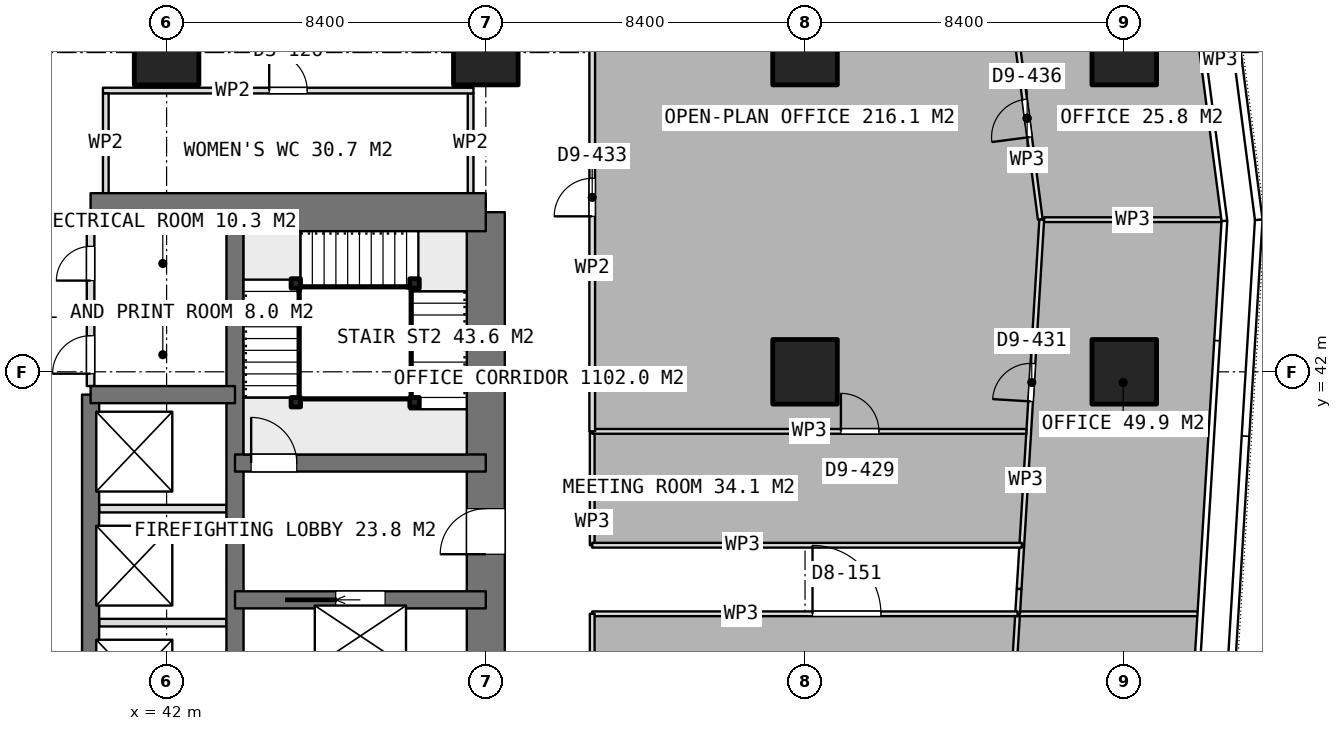
"""IFC4 building model, lengths in metres.
Left out: names, types, materials, properties, quantities, classifications, styles, units other than length and angle.
Written with IfcOpenShell. Run it as: python <this file> out.ifc"""

import sys

from ifc_helpers import new_model, si_unit, direction, frame, frame_2d, origin, origin_2d, place, context, subcontext, project, spatial, rectangle, extrude, element, fill, save


model = new_model("IFC4")
c1 = context("Model", 3, precision=1e-05, world=origin(), true_north=direction((0.0, 1.0)))
c2 = subcontext(c1, "Body", "Model", "MODEL_VIEW")
j1 = project(units=[si_unit("LENGTHUNIT", "METRE"), si_unit("PLANEANGLEUNIT", "RADIAN")], contexts=[c1])
p1 = place(None, origin())
s1 = spatial("IfcSite", under=j1, at=p1, CompositionType="ELEMENT")
p2 = place(p1, origin())
s2 = spatial("IfcBuilding", under=s1, at=p2, CompositionType="ELEMENT")
p3 = place(p2, frame((0.0, 0.0, 117.8)))
s3 = spatial("IfcBuildingStorey", under=s2, at=p3, CompositionType="ELEMENT", Elevation=117.8)
p4 = place(p3, frame((40.0, 46.2, 0.0), z_axis=(0.0, 0.0, 1.0), x_axis=(1.0, 0.0, 0.0)))
e1 = element("IfcWall", 1, at=p4, inside=s3, PredefinedType="SHEAR", context=c2, shape_type="SweptSolid", body=[
    extrude(rectangle(XDim=10.4, YDim=1.0, at=frame_2d((5.2, 0.0))), origin(), (0.0, 0.0, 1.0), 3.75),
])
p5 = place(p3, frame((50.4, 21.0, 0.0), z_axis=(0.0, 0.0, 1.0), x_axis=(0.0, 1.0, 0.0)))
e2 = element("IfcWall", 2, at=p5, inside=s3, PredefinedType="SHEAR", context=c2, shape_type="SweptSolid", body=[
    extrude(rectangle(XDim=25.2, YDim=1.0, at=frame_2d((12.6, 0.0))), origin(), (0.0, 0.0, 1.0), 3.75),
])
p6 = place(p5, frame((16.2, 0.0, 0.0)))
e3 = element("IfcOpeningElement", 3, at=p6, cuts=e2, PredefinedType="OPENING", context=c2, shape_type="SweptSolid", body=[
    extrude(rectangle(XDim=1.2, YDim=2.1, at=frame_2d((0.6, 1.05))), frame((0.0, 0.51, 0.0), z_axis=(0.0, -1.0, 0.0), x_axis=(1.0, 0.0, 0.0)), (0.0, 0.0, 1.0), 1.02),
])
p7 = place(p5, frame((10.05, 0.0, 0.0)))
e4 = element("IfcOpeningElement", 4, at=p7, cuts=e2, PredefinedType="OPENING", context=c2, shape_type="SweptSolid", body=[
    extrude(rectangle(XDim=0.9, YDim=2.1, at=frame_2d((0.45, 1.05))), frame((0.0, 0.51, 0.0), z_axis=(0.0, -1.0, 0.0), x_axis=(1.0, 0.0, 0.0)), (0.0, 0.0, 1.0), 1.02),
])
p8 = place(p5, frame((7.45, 0.0, 0.0)))
e5 = element("IfcOpeningElement", 5, at=p8, cuts=e2, PredefinedType="OPENING", context=c2, shape_type="SweptSolid", body=[
    extrude(rectangle(XDim=0.9, YDim=2.1, at=frame_2d((0.45, 1.05))), frame((0.0, 0.51, 0.0), z_axis=(0.0, -1.0, 0.0), x_axis=(1.0, 0.0, 0.0)), (0.0, 0.0, 1.0), 1.02),
])
p9 = place(p5, frame((0.7, 0.0, 0.0)))
e6 = element("IfcOpeningElement", 6, at=p9, cuts=e2, PredefinedType="OPENING", context=c2, shape_type="SweptSolid", body=[
    extrude(rectangle(XDim=1.2, YDim=2.1, at=frame_2d((0.6, 1.05))), frame((0.0, 0.51, 0.0), z_axis=(0.0, -1.0, 0.0), x_axis=(1.0, 0.0, 0.0)), (0.0, 0.0, 1.0), 1.02),
])
p10 = place(p3, frame((43.8, 21.0, 0.0), z_axis=(0.0, 0.0, 1.0), x_axis=(0.0, 1.0, 0.0)))
e7 = element("IfcWall", 7, at=p10, inside=s3, PredefinedType="SHEAR", context=c2, shape_type="SweptSolid", body=[
    extrude(rectangle(XDim=25.2, YDim=0.45, at=frame_2d((12.6, 0.0))), origin(), (0.0, 0.0, 1.0), 3.75),
])
p11 = place(p3, frame((40.0, 23.4, 0.0), z_axis=(0.0, 0.0, 1.0), x_axis=(0.0, 1.0, 0.0)))
e8 = element("IfcWall", 8, at=p11, inside=s3, PredefinedType="SHEAR", context=c2, shape_type="SweptSolid", body=[
    extrude(rectangle(XDim=18.0, YDim=0.45, at=frame_2d((9.0, 0.0))), origin(), (0.0, 0.0, 1.0), 3.75),
])
p12 = place(p11, frame((0.4, 0.0, 0.0)))
e9 = element("IfcOpeningElement", 9, at=p12, cuts=e8, PredefinedType="OPENING", context=c2, shape_type="SweptSolid", body=[
    extrude(rectangle(XDim=0.9, YDim=2.1, at=frame_2d((0.45, 1.05))), frame((0.0, 0.235, 0.0), z_axis=(0.0, -1.0, 0.0), x_axis=(1.0, 0.0, 0.0)), (0.0, 0.0, 1.0), 0.47),
])
p13 = place(p11, frame((3.35, 0.0, 0.0)))
e10 = element("IfcOpeningElement", 10, at=p13, cuts=e8, PredefinedType="OPENING", context=c2, shape_type="SweptSolid", body=[
    extrude(rectangle(XDim=1.0, YDim=2.1, at=frame_2d((0.5, 1.05))), frame((0.0, 0.235, 0.0), z_axis=(0.0, -1.0, 0.0), x_axis=(1.0, 0.0, 0.0)), (0.0, 0.0, 1.0), 0.47),
])
p14 = place(p3, frame((40.0, 41.4, 0.0), z_axis=(0.0, 0.0, 1.0), x_axis=(1.0, 0.0, 0.0)))
e11 = element("IfcWall", 11, at=p14, inside=s3, PredefinedType="SHEAR", context=c2, shape_type="SweptSolid", body=[
    extrude(rectangle(XDim=3.8, YDim=0.45, at=frame_2d((1.9, 0.0))), origin(), (0.0, 0.0, 1.0), 3.75),
])
p15 = place(p3, frame((43.8, 36.0, 0.0), z_axis=(0.0, 0.0, 1.0), x_axis=(1.0, 0.0, 0.0)))
e12 = element("IfcWall", 12, at=p15, inside=s3, PredefinedType="SHEAR", context=c2, shape_type="SweptSolid", body=[
    extrude(rectangle(XDim=6.6, YDim=0.45, at=frame_2d((3.3, 0.0))), origin(), (0.0, 0.0, 1.0), 3.75),
])
p16 = place(p15, frame((2.65, 0.0, 0.0)))
e13 = element("IfcOpeningElement", 13, at=p16, cuts=e12, PredefinedType="OPENING", context=c2, shape_type="SweptSolid", body=[
    extrude(rectangle(XDim=1.3, YDim=2.1, at=frame_2d((0.65, 1.05))), frame((0.0, 0.235, 0.0), z_axis=(0.0, -1.0, 0.0), x_axis=(1.0, 0.0, 0.0)), (0.0, 0.0, 1.0), 0.47),
])
p17 = place(p3, frame((43.8, 39.6, 0.0), z_axis=(0.0, 0.0, 1.0), x_axis=(1.0, 0.0, 0.0)))
e14 = element("IfcWall", 14, at=p17, inside=s3, PredefinedType="SHEAR", context=c2, shape_type="SweptSolid", body=[
    extrude(rectangle(XDim=6.6, YDim=0.45, at=frame_2d((3.3, 0.0))), origin(), (0.0, 0.0, 1.0), 3.75),
])
p18 = place(p17, frame((0.425, 0.0, 0.0)))
e15 = element("IfcOpeningElement", 15, at=p18, cuts=e14, PredefinedType="OPENING", context=c2, shape_type="SweptSolid", body=[
    extrude(rectangle(XDim=1.2, YDim=2.1, at=frame_2d((0.6, 1.05))), frame((0.0, 0.235, 0.0), z_axis=(0.0, -1.0, 0.0), x_axis=(1.0, 0.0, 0.0)), (0.0, 0.0, 1.0), 0.47),
])
for number, where, z_axis, x_axis in (
    (16, (42.0, 50.4, 0.0), (0.0, 0.0, 1.0), (1.0, 0.0, 0.0)),
    (17, (50.4, 50.4, 0.0), (0.0, 0.0, 1.0), (1.0, 0.0, 0.0)),
    (18, (58.8, 42.0, 0.0), (0.0, 0.0, 1.0), (1.0, 0.0, 0.0)),
    (19, (58.8, 50.4, 0.0), (0.0, 0.0, 1.0), (1.0, 0.0, 0.0)),
    (20, (67.2, 42.0, 0.0), (0.0, 0.0, 1.0), (1.0, 0.0, 0.0)),
    (21, (67.2, 50.4, 0.0), (0.0, 0.0, 1.0), (1.0, 0.0, 0.0)),
):
    element("IfcColumn", number, at=place(p3, frame(where, z_axis=z_axis, x_axis=x_axis)), inside=s3, PredefinedType="COLUMN", context=c2, shape_type="SweptSolid", body=[
        extrude(rectangle(XDim=1.7, YDim=1.7, at=origin_2d()), origin(), (0.0, 0.0, 1.0), 3.75),
    ])
for number, where, z_axis, x_axis in (
    (22, (40.225, 35.4, 0.0), (0.0, 0.0, 1.0), (1.0, 0.0, 0.0)),
    (23, (40.225, 38.4, 0.0), (0.0, 0.0, 1.0), (1.0, 0.0, 0.0)),
):
    element("IfcWall", number, at=place(p3, frame(where, z_axis=z_axis, x_axis=x_axis)), inside=s3, PredefinedType="PARTITIONING", context=c2, shape_type="SweptSolid", body=[
        extrude(rectangle(XDim=3.35, YDim=0.2, at=frame_2d((1.675, 0.0))), origin(), (0.0, 0.0, 1.0), 3.5),
    ])
p19 = place(p3, frame((40.0, 41.625, 0.0), z_axis=(0.0, 0.0, 1.0), x_axis=(0.0, 1.0, 0.0)))
e24 = element("IfcWall", 24, at=p19, inside=s3, PredefinedType="PARTITIONING", context=c2, shape_type="SweptSolid", body=[
    extrude(rectangle(XDim=4.075, YDim=0.2, at=frame_2d((2.038, 0.0))), origin(), (0.0, 0.0, 1.0), 3.5),
])
p20 = place(p19, frame((2.775, 0.0, 0.0)))
e25 = element("IfcOpeningElement", 25, at=p20, cuts=e24, PredefinedType="OPENING", context=c2, shape_type="SweptSolid", body=[
    extrude(rectangle(XDim=0.9, YDim=2.1, at=frame_2d((0.45, 1.05))), frame((0.0, 0.11, 0.0), z_axis=(0.0, -1.0, 0.0), x_axis=(1.0, 0.0, 0.0)), (0.0, 0.0, 1.0), 0.22),
])
p21 = place(p19, frame((0.325, 0.0, 0.0)))
e26 = element("IfcOpeningElement", 26, at=p21, cuts=e24, PredefinedType="OPENING", context=c2, shape_type="SweptSolid", body=[
    extrude(rectangle(XDim=1.0, YDim=2.1, at=frame_2d((0.5, 1.05))), frame((0.0, 0.11, 0.0), z_axis=(0.0, -1.0, 0.0), x_axis=(1.0, 0.0, 0.0)), (0.0, 0.0, 1.0), 0.22),
])
p22 = place(p3, frame((40.0, 43.5, 0.0), z_axis=(0.0, 0.0, 1.0), x_axis=(1.0, 0.0, 0.0)))
e27 = element("IfcWall", 27, at=p22, inside=s3, PredefinedType="PARTITIONING", context=c2, shape_type="SweptSolid", body=[
    extrude(rectangle(XDim=3.575, YDim=0.2, at=frame_2d((1.788, 0.0))), origin(), (0.0, 0.0, 1.0), 3.5),
])
p23 = place(p3, frame((40.325, 49.4, 0.0), z_axis=(0.0, 0.0, 1.0), x_axis=(1.0, 0.0, 0.0)))
e28 = element("IfcWall", 28, at=p23, inside=s3, PredefinedType="PARTITIONING", context=c2, shape_type="SweptSolid", body=[
    extrude(rectangle(XDim=9.75, YDim=0.15, at=frame_2d((4.875, 0.0))), origin(), (0.0, 0.0, 1.0), 3.5),
])
p24 = place(p23, frame((4.375, 0.0, 0.0)))
e29 = element("IfcOpeningElement", 29, at=p24, cuts=e28, PredefinedType="OPENING", context=c2, shape_type="SweptSolid", body=[
    extrude(rectangle(XDim=1.0, YDim=2.1, at=frame_2d((0.5, 1.05))), frame((0.0, 0.085, 0.0), z_axis=(0.0, -1.0, 0.0), x_axis=(1.0, 0.0, 0.0)), (0.0, 0.0, 1.0), 0.17),
])
for number, where, z_axis, x_axis in (
    (30, (40.4, 46.7, 0.0), (0.0, 0.0, 1.0), (0.0, 1.0, 0.0)),
    (31, (50.0, 46.7, 0.0), (0.0, 0.0, 1.0), (0.0, 1.0, 0.0)),
):
    element("IfcWall", number, at=place(p3, frame(where, z_axis=z_axis, x_axis=x_axis)), inside=s3, PredefinedType="PARTITIONING", context=c2, shape_type="SweptSolid", body=[
        extrude(rectangle(XDim=2.625, YDim=0.15, at=frame_2d((1.312, 0.0))), origin(), (0.0, 0.0, 1.0), 3.5),
    ])
p25 = place(p3, frame((63.926, 27.997, 0.0), z_axis=(0.0, 0.0, 1.0), x_axis=(0.061176245149, 0.998126979412, 0.0)))
e32 = element("IfcWall", 32, at=p25, inside=s3, PredefinedType="PARTITIONING", context=c2, shape_type="SweptSolid", body=[
    extrude(rectangle(XDim=7.65, YDim=0.125, at=frame_2d((3.825, 0.0))), origin(), (0.0, 0.0, 1.0), 3.5),
])
p26 = place(p25, frame((3.325, 0.0, 0.0)))
e33 = element("IfcOpeningElement", 33, at=p26, cuts=e32, PredefinedType="OPENING", context=c2, shape_type="SweptSolid", body=[
    extrude(rectangle(XDim=1.0, YDim=2.1, at=frame_2d((0.5, 1.05))), frame((0.0, 0.073, 0.0), z_axis=(0.0, -1.0, 0.0), x_axis=(1.0, 0.0, 0.0)), (0.0, 0.0, 1.0), 0.145),
])
p27 = place(p3, frame((64.394, 35.633, 0.0), z_axis=(0.0, 0.0, 1.0), x_axis=(1.0, 0.0, 0.0)))
e34 = element("IfcWall", 34, at=p27, inside=s3, PredefinedType="PARTITIONING", context=c2, shape_type="SweptSolid", body=[
    extrude(rectangle(XDim=4.758, YDim=0.125, at=frame_2d((2.379, 0.0))), origin(), (0.0, 0.0, 1.0), 3.5),
])
p28 = place(p3, frame((64.434, 36.286, 0.0), z_axis=(0.0, 0.0, 1.0), x_axis=(0.060546193712, 0.998165396328, 0.0)))
e35 = element("IfcWall", 35, at=p28, inside=s3, PredefinedType="PARTITIONING", context=c2, shape_type="SweptSolid", body=[
    extrude(rectangle(XDim=1.153, YDim=0.125, at=frame_2d((0.577, 0.0))), origin(), (0.0, 0.0, 1.0), 3.5),
])
p29 = place(p3, frame((64.504, 37.437, 0.0), z_axis=(0.0, 0.0, 1.0), x_axis=(0.061148210755, 0.998128697274, 0.0)))
e36 = element("IfcWall", 36, at=p29, inside=s3, PredefinedType="PARTITIONING", context=c2, shape_type="SweptSolid", body=[
    extrude(rectangle(XDim=8.588, YDim=0.125, at=frame_2d((4.294, 0.0))), origin(), (0.0, 0.0, 1.0), 3.5),
])
p30 = place(p29, frame((3.791, 0.0, 0.0)))
e37 = element("IfcOpeningElement", 37, at=p30, cuts=e36, PredefinedType="OPENING", context=c2, shape_type="SweptSolid", body=[
    extrude(rectangle(XDim=1.0, YDim=2.1, at=frame_2d((0.5, 1.05))), frame((0.0, 0.073, 0.0), z_axis=(0.0, -1.0, 0.0), x_axis=(1.0, 0.0, 0.0)), (0.0, 0.0, 1.0), 0.145),
])
p31 = place(p3, frame((65.091, 46.003, 0.0), z_axis=(0.0, 0.0, 1.0), x_axis=(1.0, 0.0, 0.0)))
e38 = element("IfcWall", 38, at=p31, inside=s3, PredefinedType="PARTITIONING", context=c2, shape_type="SweptSolid", body=[
    extrude(rectangle(XDim=4.66, YDim=0.125, at=frame_2d((2.33, 0.0))), origin(), (0.0, 0.0, 1.0), 3.5),
])
p32 = place(p3, frame((64.394, 35.634, 0.0), z_axis=(0.0, 0.0, 1.0), x_axis=(0.061307678676, 0.998118915027, 0.0)))
e39 = element("IfcWall", 39, at=p32, inside=s3, PredefinedType="PARTITIONING", context=c2, shape_type="SweptSolid", body=[
    extrude(rectangle(XDim=0.653, YDim=0.125, at=frame_2d((0.327, 0.0))), origin(), (0.0, 0.0, 1.0), 3.5),
])
p33 = place(p3, frame((64.99, 46.011, 0.0), z_axis=(0.0, 0.0, 1.0), x_axis=(-0.128983610929, 0.991646725458, 0.0)))
e40 = element("IfcWall", 40, at=p33, inside=s3, PredefinedType="PARTITIONING", context=c2, shape_type="SweptSolid", body=[
    extrude(rectangle(XDim=5.372, YDim=0.125, at=frame_2d((2.686, 0.0))), origin(), (0.0, 0.0, 1.0), 3.5),
])
p34 = place(p33, frame((2.182, 0.0, 0.0)))
e41 = element("IfcOpeningElement", 41, at=p34, cuts=e40, PredefinedType="OPENING", context=c2, shape_type="SweptSolid", body=[
    extrude(rectangle(XDim=1.0, YDim=2.1, at=frame_2d((0.5, 1.05))), frame((0.0, 0.073, 0.0), z_axis=(0.0, -1.0, 0.0), x_axis=(1.0, 0.0, 0.0)), (0.0, 0.0, 1.0), 0.145),
])
p35 = place(p3, frame((53.2, 35.633, 0.0), z_axis=(0.0, 0.0, 1.0), x_axis=(1.0, 0.0, 0.0)))
e42 = element("IfcWall", 42, at=p35, inside=s3, PredefinedType="PARTITIONING", context=c2, shape_type="SweptSolid", body=[
    extrude(rectangle(XDim=11.194, YDim=0.125, at=frame_2d((5.597, 0.0))), origin(), (0.0, 0.0, 1.0), 3.5),
])
p36 = place(p35, frame((5.797, 0.0, 0.0)))
e43 = element("IfcOpeningElement", 43, at=p36, cuts=e42, PredefinedType="OPENING", context=c2, shape_type="SweptSolid", body=[
    extrude(rectangle(XDim=1.8, YDim=2.1, at=frame_2d((0.9, 1.05))), frame((0.0, 0.073, 0.0), z_axis=(0.0, -1.0, 0.0), x_axis=(1.0, 0.0, 0.0)), (0.0, 0.0, 1.0), 0.145),
])
p37 = place(p3, frame((53.2, 28.075, 0.0), z_axis=(0.0, 0.0, 1.0), x_axis=(0.0, 1.0, 0.0)))
e44 = element("IfcWall", 44, at=p37, inside=s3, PredefinedType="PARTITIONING", context=c2, shape_type="SweptSolid", body=[
    extrude(rectangle(XDim=7.558, YDim=0.125, at=frame_2d((3.779, 0.0))), origin(), (0.0, 0.0, 1.0), 3.5),
])
p38 = place(p3, frame((53.2, 37.437, 0.0), z_axis=(0.0, 0.0, 1.0), x_axis=(0.0, 1.0, 0.0)))
e45 = element("IfcWall", 45, at=p38, inside=s3, PredefinedType="PARTITIONING", context=c2, shape_type="SweptSolid", body=[
    extrude(rectangle(XDim=2.996, YDim=0.125, at=frame_2d((1.498, 0.0))), origin(), (0.0, 0.0, 1.0), 3.5),
])
p39 = place(p3, frame((53.2, 40.433, 0.0), z_axis=(0.0, 0.0, 1.0), x_axis=(1.0, 0.0, 0.0)))
e46 = element("IfcWall", 46, at=p39, inside=s3, PredefinedType="PARTITIONING", context=c2, shape_type="SweptSolid", body=[
    extrude(rectangle(XDim=11.425, YDim=0.125, at=frame_2d((5.712, 0.0))), origin(), (0.0, 0.0, 1.0), 3.5),
])
p40 = place(p39, frame((6.544, 0.0, 0.0)))
e47 = element("IfcOpeningElement", 47, at=p40, cuts=e46, PredefinedType="OPENING", context=c2, shape_type="SweptSolid", body=[
    extrude(rectangle(XDim=1.0, YDim=2.1, at=frame_2d((0.5, 1.05))), frame((0.0, 0.073, 0.0), z_axis=(0.0, -1.0, 0.0), x_axis=(1.0, 0.0, 0.0)), (0.0, 0.0, 1.0), 0.145),
])
p41 = place(p3, frame((64.504, 37.437, 0.0), z_axis=(0.0, 0.0, 1.0), x_axis=(-1.0, 0.0, 0.0)))
e48 = element("IfcWall", 48, at=p41, inside=s3, PredefinedType="PARTITIONING", context=c2, shape_type="SweptSolid", body=[
    extrude(rectangle(XDim=11.304, YDim=0.125, at=frame_2d((5.652, 0.0))), origin(), (0.0, 0.0, 1.0), 3.5),
])
p42 = place(p3, frame((53.2, 40.433, 0.0), z_axis=(0.0, 0.0, 1.0), x_axis=(0.0, 1.0, 0.0)))
e49 = element("IfcWall", 49, at=p42, inside=s3, PredefinedType="PARTITIONING", context=c2, shape_type="SweptSolid", body=[
    extrude(rectangle(XDim=12.317, YDim=0.15, at=frame_2d((6.158, 0.0))), origin(), (0.0, 0.0, 1.0), 3.5),
])
p43 = place(p42, frame((5.658, 0.0, 0.0)))
e50 = element("IfcOpeningElement", 50, at=p43, cuts=e49, PredefinedType="OPENING", context=c2, shape_type="SweptSolid", body=[
    extrude(rectangle(XDim=1.0, YDim=2.1, at=frame_2d((0.5, 1.05))), frame((0.0, 0.085, 0.0), z_axis=(0.0, -1.0, 0.0), x_axis=(1.0, 0.0, 0.0)), (0.0, 0.0, 1.0), 0.17),
])
for number, where, z_axis, x_axis in (
    (51, (45.4, 41.2, 0.0), (0.0, 0.0, 1.0), (1.0, 0.0, 0.0)),
    (52, (45.4, 44.325, 0.0), (0.0, 0.0, 1.0), (1.0, 0.0, 0.0)),
    (53, (48.525, 44.325, 0.0), (0.0, 0.0, 1.0), (1.0, 0.0, 0.0)),
    (54, (48.525, 41.2, 0.0), (0.0, 0.0, 1.0), (1.0, 0.0, 0.0)),
):
    element("IfcColumn", number, at=place(p3, frame(where, z_axis=z_axis, x_axis=x_axis)), inside=s3, PredefinedType="COLUMN", context=c2, shape_type="SweptSolid", body=[
        extrude(rectangle(XDim=0.25, YDim=0.25, at=origin_2d()), origin(), (0.0, 0.0, 1.0), 3.75),
    ])
p44 = place(p6, origin())
e55 = element("IfcDoor", 55, at=p44, inside=s3, OperationType="SINGLE_SWING_LEFT", PredefinedType="DOOR", context=c2, shape_type="SweptSolid", body=[
    extrude(rectangle(XDim=1.2, YDim=2.1, at=frame_2d((0.6, 1.05))), frame((0.0, 0.025, 0.0), z_axis=(0.0, -1.0, 0.0), x_axis=(1.0, 0.0, 0.0)), (0.0, 0.0, 1.0), 0.05),
])
fill(e3, e55)
p45 = place(p20, origin())
e56 = element("IfcDoor", 56, at=p45, inside=s3, OperationType="SINGLE_SWING_LEFT", PredefinedType="DOOR", context=c2, shape_type="SweptSolid", body=[
    extrude(rectangle(XDim=0.9, YDim=2.1, at=frame_2d((0.45, 1.05))), frame((0.0, 0.025, 0.0), z_axis=(0.0, -1.0, 0.0), x_axis=(1.0, 0.0, 0.0)), (0.0, 0.0, 1.0), 0.05),
])
fill(e25, e56)
p46 = place(p21, origin())
e57 = element("IfcDoor", 57, at=p46, inside=s3, OperationType="SINGLE_SWING_LEFT", PredefinedType="DOOR", context=c2, shape_type="SweptSolid", body=[
    extrude(rectangle(XDim=1.0, YDim=2.1, at=frame_2d((0.5, 1.05))), frame((0.0, 0.025, 0.0), z_axis=(0.0, -1.0, 0.0), x_axis=(1.0, 0.0, 0.0)), (0.0, 0.0, 1.0), 0.05),
])
fill(e26, e57)
p47 = place(p16, origin())
e58 = element("IfcDoor", 58, at=p47, inside=s3, OperationType="SLIDING_TO_LEFT", PredefinedType="USERDEFINED", context=c2, shape_type="SweptSolid", body=[
    extrude(rectangle(XDim=1.3, YDim=2.1, at=frame_2d((0.65, 1.05))), frame((0.0, 0.025, 0.0), z_axis=(0.0, -1.0, 0.0), x_axis=(1.0, 0.0, 0.0)), (0.0, 0.0, 1.0), 0.05),
])
fill(e13, e58)
p48 = place(p24, origin())
e59 = element("IfcDoor", 59, at=p48, inside=s3, OperationType="SINGLE_SWING_LEFT", PredefinedType="DOOR", context=c2, shape_type="SweptSolid", body=[
    extrude(rectangle(XDim=1.0, YDim=2.1, at=frame_2d((0.5, 1.05))), frame((0.0, 0.025, 0.0), z_axis=(0.0, -1.0, 0.0), x_axis=(1.0, 0.0, 0.0)), (0.0, 0.0, 1.0), 0.05),
])
fill(e29, e59)
p49 = place(p30, origin())
e60 = element("IfcDoor", 60, at=p49, inside=s3, OperationType="SINGLE_SWING_LEFT", PredefinedType="DOOR", context=c2, shape_type="SweptSolid", body=[
    extrude(rectangle(XDim=1.0, YDim=2.1, at=frame_2d((0.5, 1.05))), frame((0.0, 0.025, 0.0), z_axis=(0.0, -1.0, 0.0), x_axis=(1.0, 0.0, 0.0)), (0.0, 0.0, 1.0), 0.05),
])
fill(e37, e60)
p50 = place(p34, origin())
e61 = element("IfcDoor", 61, at=p50, inside=s3, OperationType="SINGLE_SWING_LEFT", PredefinedType="DOOR", context=c2, shape_type="SweptSolid", body=[
    extrude(rectangle(XDim=1.0, YDim=2.1, at=frame_2d((0.5, 1.05))), frame((0.0, 0.025, 0.0), z_axis=(0.0, -1.0, 0.0), x_axis=(1.0, 0.0, 0.0)), (0.0, 0.0, 1.0), 0.05),
])
fill(e41, e61)
p51 = place(p36, origin())
e62 = element("IfcDoor", 62, at=p51, inside=s3, OperationType="DOUBLE_DOOR_SINGLE_SWING", PredefinedType="DOOR", context=c2, shape_type="SweptSolid", body=[
    extrude(rectangle(XDim=1.8, YDim=2.1, at=frame_2d((0.9, 1.05))), frame((0.0, 0.025, 0.0), z_axis=(0.0, -1.0, 0.0), x_axis=(1.0, 0.0, 0.0)), (0.0, 0.0, 1.0), 0.05),
])
fill(e43, e62)
p52 = place(p40, origin())
e63 = element("IfcDoor", 63, at=p52, inside=s3, OperationType="SINGLE_SWING_LEFT", PredefinedType="DOOR", context=c2, shape_type="SweptSolid", body=[
    extrude(rectangle(XDim=1.0, YDim=2.1, at=frame_2d((0.5, 1.05))), frame((0.0, 0.025, 0.0), z_axis=(0.0, -1.0, 0.0), x_axis=(1.0, 0.0, 0.0)), (0.0, 0.0, 1.0), 0.05),
])
fill(e47, e63)
p53 = place(p43, origin())
e64 = element("IfcDoor", 64, at=p53, inside=s3, OperationType="SINGLE_SWING_LEFT", PredefinedType="DOOR", context=c2, shape_type="SweptSolid", body=[
    extrude(rectangle(XDim=1.0, YDim=2.1, at=frame_2d((0.5, 1.05))), frame((0.0, 0.025, 0.0), z_axis=(0.0, -1.0, 0.0), x_axis=(1.0, 0.0, 0.0)), (0.0, 0.0, 1.0), 0.05),
])
fill(e50, e64)
p54 = place(p18, origin())
e65 = element("IfcDoor", 65, at=p54, inside=s3, OperationType="SINGLE_SWING_RIGHT", PredefinedType="DOOR", context=c2, shape_type="SweptSolid", body=[
    extrude(rectangle(XDim=1.2, YDim=2.1, at=frame_2d((0.6, 1.05))), frame((0.0, 0.025, 0.0), z_axis=(0.0, -1.0, 0.0), x_axis=(1.0, 0.0, 0.0)), (0.0, 0.0, 1.0), 0.05),
])
fill(e15, e65)
save(model, sys.argv[1])
